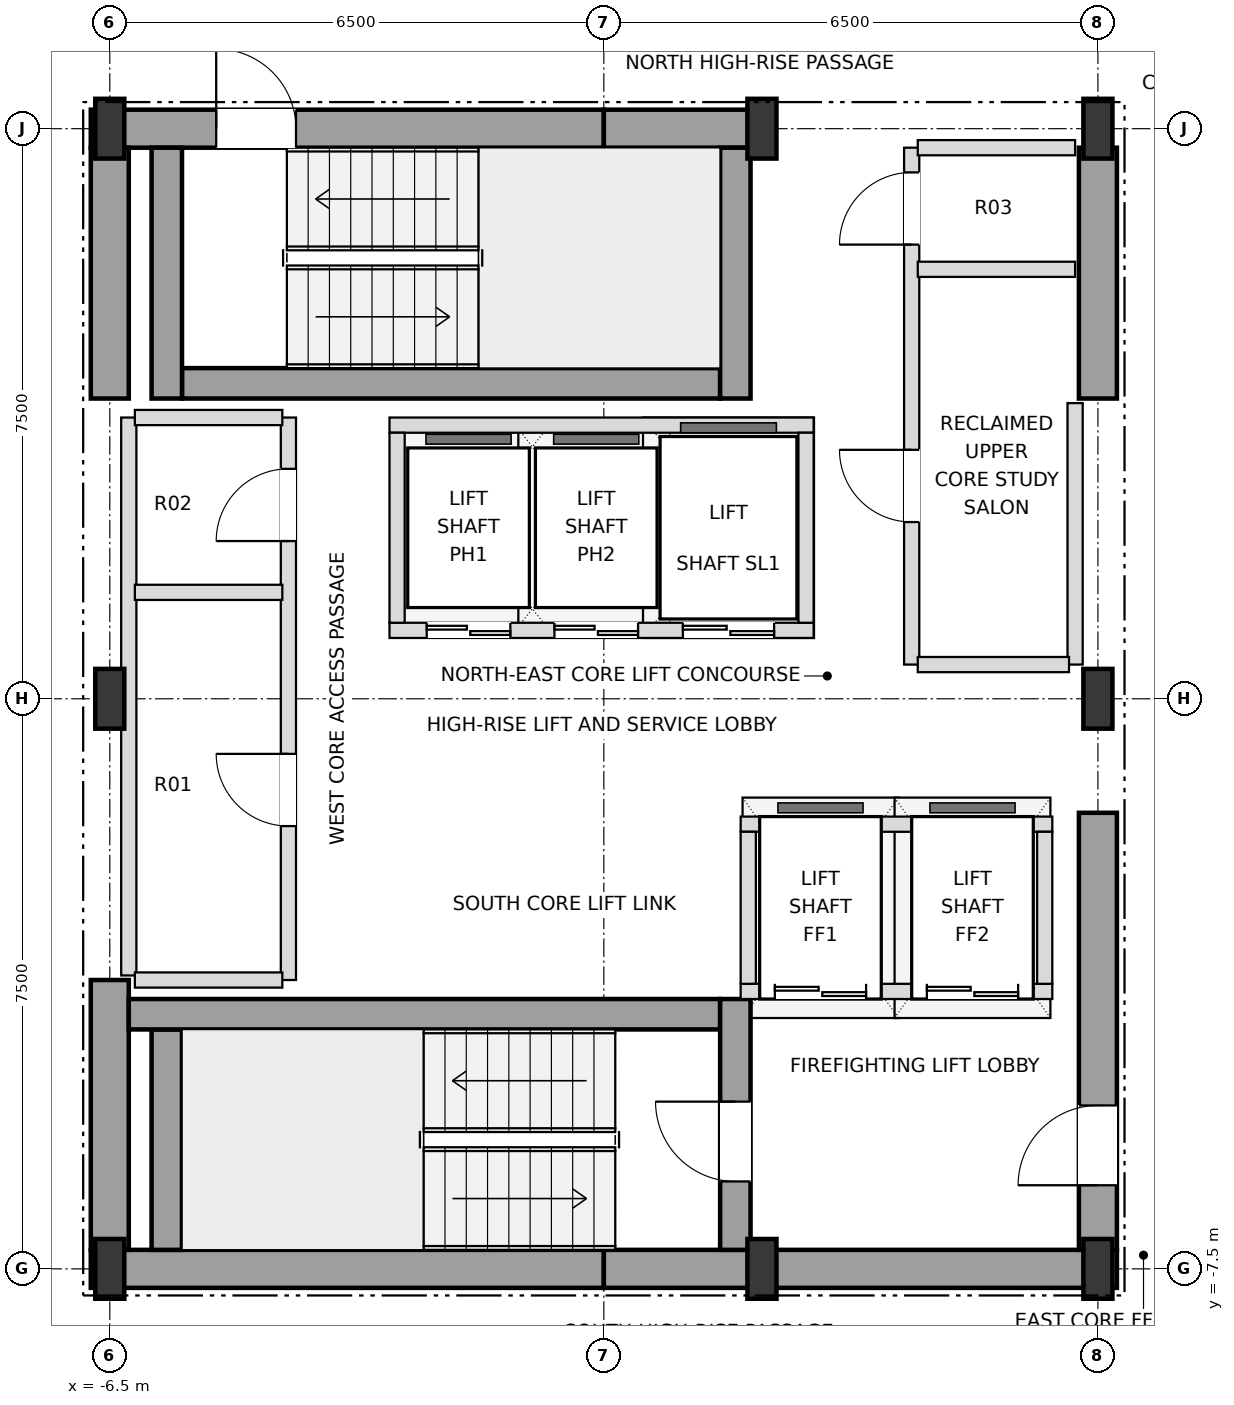
"""IFC4 building model, lengths in metres.
Left out: names, types, materials, properties, quantities, classifications, styles, units other than length and angle.
Written with IfcOpenShell. Run it as: python <this file> out.ifc"""

import sys

from ifc_helpers import new_model, si_unit, direction, frame, frame_2d, origin, origin_2d, place, context, subcontext, project, spatial, rectangle, i_section, extrude, element, fill, save


model = new_model("IFC4")
c1 = context("Model", 3, precision=1e-05, world=origin(), true_north=direction((0.0, 1.0)))
c2 = subcontext(c1, "Body", "Model", "MODEL_VIEW")
j1 = project(units=[si_unit("LENGTHUNIT", "METRE"), si_unit("PLANEANGLEUNIT", "RADIAN")], contexts=[c1])
p1 = place(None, origin())
s1 = spatial("IfcSite", under=j1, at=p1, CompositionType="ELEMENT")
p2 = place(p1, origin())
s2 = spatial("IfcBuilding", under=s1, at=p2, CompositionType="ELEMENT")
p3 = place(p2, frame((0.0, 0.0, 247.5)))
s3 = spatial("IfcBuildingStorey", under=s2, at=p3, CompositionType="ELEMENT", Elevation=247.5)
for number, where, z_axis, x_axis in (
    (1, (-6.5, -7.5, 0.0), (0.0, 0.0, 1.0), (1.0, 0.0, 0.0)),
    (2, (2.08, -7.5, 0.0), (0.0, 0.0, 1.0), (1.0, 0.0, 0.0)),
    (3, (6.5, -7.5, 0.0), (0.0, 0.0, 1.0), (1.0, 0.0, 0.0)),
    (4, (-6.5, 0.0, 0.0), (0.0, 0.0, 1.0), (1.0, 0.0, 0.0)),
    (5, (6.5, 0.0, 0.0), (0.0, 0.0, 1.0), (1.0, 0.0, 0.0)),
    (6, (-6.5, 7.5, 0.0), (0.0, 0.0, 1.0), (1.0, 0.0, 0.0)),
    (7, (2.08, 7.5, 0.0), (0.0, 0.0, 1.0), (1.0, 0.0, 0.0)),
    (8, (6.5, 7.5, 0.0), (0.0, 0.0, 1.0), (1.0, 0.0, 0.0)),
):
    element("IfcColumn", number, at=place(p3, frame(where, z_axis=z_axis, x_axis=x_axis)), inside=s3, PredefinedType="COLUMN", context=c2, shape_type="SweptSolid", body=[
        extrude(i_section(OverallWidth=0.382, OverallDepth=0.786, WebThickness=0.02, FlangeThickness=0.033, at=origin_2d()), origin(), (0.0, 0.0, 1.0), 3.6),
    ])
for number, where, z_axis, x_axis in (
    (9, (-6.75, -7.5, 0.0), (0.0, 0.0, 1.0), (1.0, 0.0, 0.0)),
    (10, (0.0, -7.5, 0.0), (0.0, 0.0, 1.0), (1.0, 0.0, 0.0)),
):
    element("IfcWall", number, at=place(p3, frame(where, z_axis=z_axis, x_axis=x_axis)), inside=s3, PredefinedType="SHEAR", context=c2, shape_type="SweptSolid", body=[
        extrude(rectangle(XDim=6.75, YDim=0.5, at=frame_2d((3.375, 0.0))), origin(), (0.0, 0.0, 1.0), 3.38),
    ])
p4 = place(p3, frame((-6.75, 7.5, 0.0), z_axis=(0.0, 0.0, 1.0), x_axis=(1.0, 0.0, 0.0)))
e11 = element("IfcWall", 11, at=p4, inside=s3, PredefinedType="SHEAR", context=c2, shape_type="SweptSolid", body=[
    extrude(rectangle(XDim=6.75, YDim=0.5, at=frame_2d((3.375, 0.0))), origin(), (0.0, 0.0, 1.0), 3.38),
])
p5 = place(p4, frame((1.65, 0.0, 0.0)))
e12 = element("IfcOpeningElement", 12, at=p5, cuts=e11, PredefinedType="OPENING", context=c2, shape_type="SweptSolid", body=[
    extrude(rectangle(XDim=1.05, YDim=2.15, at=frame_2d((0.525, 1.075))), frame((0.0, 0.26, 0.0), z_axis=(0.0, -1.0, 0.0), x_axis=(1.0, 0.0, 0.0)), (0.0, 0.0, 1.0), 0.52),
])
p6 = place(p3, frame((0.0, 7.5, 0.0), z_axis=(0.0, 0.0, 1.0), x_axis=(1.0, 0.0, 0.0)))
e13 = element("IfcWall", 13, at=p6, inside=s3, PredefinedType="SHEAR", context=c2, shape_type="SweptSolid", body=[
    extrude(rectangle(XDim=2.08, YDim=0.5, at=frame_2d((1.04, 0.0))), origin(), (0.0, 0.0, 1.0), 3.38),
])
p7 = place(p3, frame((-6.5, -7.25, 0.0), z_axis=(0.0, 0.0, 1.0), x_axis=(0.0, 1.0, 0.0)))
e14 = element("IfcWall", 14, at=p7, inside=s3, PredefinedType="SHEAR", context=c2, shape_type="SweptSolid", body=[
    extrude(rectangle(XDim=3.55, YDim=0.5, at=frame_2d((1.775, 0.0))), origin(), (0.0, 0.0, 1.0), 3.38),
])
p8 = place(p3, frame((-6.5, 3.95, 0.0), z_axis=(0.0, 0.0, 1.0), x_axis=(0.0, 1.0, 0.0)))
e15 = element("IfcWall", 15, at=p8, inside=s3, PredefinedType="SHEAR", context=c2, shape_type="SweptSolid", body=[
    extrude(rectangle(XDim=3.3, YDim=0.5, at=frame_2d((1.65, 0.0))), origin(), (0.0, 0.0, 1.0), 3.38),
])
p9 = place(p3, frame((6.5, -7.25, 0.0), z_axis=(0.0, 0.0, 1.0), x_axis=(0.0, 1.0, 0.0)))
e16 = element("IfcWall", 16, at=p9, inside=s3, PredefinedType="SHEAR", context=c2, shape_type="SweptSolid", body=[
    extrude(rectangle(XDim=5.75, YDim=0.5, at=frame_2d((2.875, 0.0))), origin(), (0.0, 0.0, 1.0), 3.38),
])
p10 = place(p9, frame((0.85, 0.0, 0.0)))
e17 = element("IfcOpeningElement", 17, at=p10, cuts=e16, PredefinedType="OPENING", context=c2, shape_type="SweptSolid", body=[
    extrude(rectangle(XDim=1.05, YDim=2.15, at=frame_2d((0.525, 1.075))), frame((0.0, 0.26, 0.0), z_axis=(0.0, -1.0, 0.0), x_axis=(1.0, 0.0, 0.0)), (0.0, 0.0, 1.0), 0.52),
])
p11 = place(p3, frame((6.5, 3.95, 0.0), z_axis=(0.0, 0.0, 1.0), x_axis=(0.0, 1.0, 0.0)))
e18 = element("IfcWall", 18, at=p11, inside=s3, PredefinedType="SHEAR", context=c2, shape_type="SweptSolid", body=[
    extrude(rectangle(XDim=3.3, YDim=0.5, at=frame_2d((1.65, 0.0))), origin(), (0.0, 0.0, 1.0), 3.38),
])
p12 = place(p3, frame((-5.75, -7.25, 0.0), z_axis=(0.0, 0.0, 1.0), x_axis=(0.0, 1.0, 0.0)))
e19 = element("IfcWall", 19, at=p12, inside=s3, PredefinedType="SHEAR", context=c2, shape_type="SweptSolid", body=[
    extrude(rectangle(XDim=2.9, YDim=0.4, at=frame_2d((1.45, 0.0))), origin(), (0.0, 0.0, 1.0), 3.38),
])
p13 = place(p3, frame((-6.25, -4.15, 0.0), z_axis=(0.0, 0.0, 1.0), x_axis=(1.0, 0.0, 0.0)))
e20 = element("IfcWall", 20, at=p13, inside=s3, PredefinedType="SHEAR", context=c2, shape_type="SweptSolid", body=[
    extrude(rectangle(XDim=7.78, YDim=0.4, at=frame_2d((3.89, 0.0))), origin(), (0.0, 0.0, 1.0), 3.38),
])
p14 = place(p3, frame((1.73, -7.25, 0.0), z_axis=(0.0, 0.0, 1.0), x_axis=(0.0, 1.0, 0.0)))
e21 = element("IfcWall", 21, at=p14, inside=s3, PredefinedType="SHEAR", context=c2, shape_type="SweptSolid", body=[
    extrude(rectangle(XDim=3.3, YDim=0.4, at=frame_2d((1.65, 0.0))), origin(), (0.0, 0.0, 1.0), 3.38),
])
p15 = place(p14, frame((0.9, 0.0, 0.0)))
e22 = element("IfcOpeningElement", 22, at=p15, cuts=e21, PredefinedType="OPENING", context=c2, shape_type="SweptSolid", body=[
    extrude(rectangle(XDim=1.05, YDim=2.15, at=frame_2d((0.525, 1.075))), frame((0.0, 0.21, 0.0), z_axis=(0.0, -1.0, 0.0), x_axis=(1.0, 0.0, 0.0)), (0.0, 0.0, 1.0), 0.42),
])
p16 = place(p3, frame((-5.55, 4.15, 0.0), z_axis=(0.0, 0.0, 1.0), x_axis=(1.0, 0.0, 0.0)))
e23 = element("IfcWall", 23, at=p16, inside=s3, PredefinedType="SHEAR", context=c2, shape_type="SweptSolid", body=[
    extrude(rectangle(XDim=7.08, YDim=0.4, at=frame_2d((3.54, 0.0))), origin(), (0.0, 0.0, 1.0), 3.38),
])
for number, where, z_axis, x_axis in (
    (24, (1.73, 3.95, 0.0), (0.0, 0.0, 1.0), (0.0, 1.0, 0.0)),
    (25, (-5.75, 3.95, 0.0), (0.0, 0.0, 1.0), (0.0, 1.0, 0.0)),
):
    element("IfcWall", number, at=place(p3, frame(where, z_axis=z_axis, x_axis=x_axis)), inside=s3, PredefinedType="SHEAR", context=c2, shape_type="SweptSolid", body=[
        extrude(rectangle(XDim=3.3, YDim=0.4, at=frame_2d((1.65, 0.0))), origin(), (0.0, 0.0, 1.0), 3.38),
    ])
p17 = place(p3, frame((-2.82, 0.9, 0.0), z_axis=(0.0, 0.0, 1.0), x_axis=(1.0, 0.0, 0.0)))
e26 = element("IfcWall", 26, at=p17, inside=s3, PredefinedType="SOLIDWALL", context=c2, shape_type="SweptSolid", body=[
    extrude(rectangle(XDim=5.58, YDim=0.2, at=frame_2d((2.79, 0.0))), origin(), (0.0, 0.0, 1.0), 3.38),
])
p18 = place(p17, frame((0.49, 0.0, 0.0)))
e27 = element("IfcOpeningElement", 27, at=p18, cuts=e26, PredefinedType="OPENING", context=c2, shape_type="SweptSolid", body=[
    extrude(rectangle(XDim=1.1, YDim=2.15, at=frame_2d((0.55, 1.075))), frame((0.0, 0.11, 0.0), z_axis=(0.0, -1.0, 0.0), x_axis=(1.0, 0.0, 0.0)), (0.0, 0.0, 1.0), 0.22),
])
p19 = place(p17, frame((2.17, 0.0, 0.0)))
e28 = element("IfcOpeningElement", 28, at=p19, cuts=e26, PredefinedType="OPENING", context=c2, shape_type="SweptSolid", body=[
    extrude(rectangle(XDim=1.1, YDim=2.15, at=frame_2d((0.55, 1.075))), frame((0.0, 0.11, 0.0), z_axis=(0.0, -1.0, 0.0), x_axis=(1.0, 0.0, 0.0)), (0.0, 0.0, 1.0), 0.22),
])
p20 = place(p17, frame((3.86, 0.0, 0.0)))
e29 = element("IfcOpeningElement", 29, at=p20, cuts=e26, PredefinedType="OPENING", context=c2, shape_type="SweptSolid", body=[
    extrude(rectangle(XDim=1.2, YDim=2.2, at=frame_2d((0.6, 1.1))), frame((0.0, 0.11, 0.0), z_axis=(0.0, -1.0, 0.0), x_axis=(1.0, 0.0, 0.0)), (0.0, 0.0, 1.0), 0.22),
])
p21 = place(p3, frame((-2.82, 3.6, 0.0), z_axis=(0.0, 0.0, 1.0), x_axis=(1.0, 0.0, 0.0)))
e30 = element("IfcWall", 30, at=p21, inside=s3, PredefinedType="SOLIDWALL", context=c2, shape_type="SweptSolid", body=[
    extrude(rectangle(XDim=5.58, YDim=0.2, at=frame_2d((2.79, 0.0))), origin(), (0.0, 0.0, 1.0), 3.38),
])
for number, where, z_axis, x_axis in (
    (31, (-2.72, 1.0, 0.0), (0.0, 0.0, 1.0), (0.0, 1.0, 0.0)),
    (32, (2.66, 1.0, 0.0), (0.0, 0.0, 1.0), (0.0, 1.0, 0.0)),
):
    element("IfcWall", number, at=place(p3, frame(where, z_axis=z_axis, x_axis=x_axis)), inside=s3, PredefinedType="SOLIDWALL", context=c2, shape_type="SweptSolid", body=[
        extrude(rectangle(XDim=2.5, YDim=0.2, at=frame_2d((1.25, 0.0))), origin(), (0.0, 0.0, 1.0), 3.38),
    ])
p22 = place(p3, frame((1.8, -3.85, 0.0), z_axis=(0.0, 0.0, 1.0), x_axis=(1.0, 0.0, 0.0)))
e33 = element("IfcWall", 33, at=p22, inside=s3, PredefinedType="SOLIDWALL", context=c2, shape_type="SweptSolid", body=[
    extrude(rectangle(XDim=4.1, YDim=0.2, at=frame_2d((2.05, 0.0))), origin(), (0.0, 0.0, 1.0), 3.38),
])
p23 = place(p22, frame((0.45, 0.0, 0.0)))
e34 = element("IfcOpeningElement", 34, at=p23, cuts=e33, PredefinedType="OPENING", context=c2, shape_type="SweptSolid", body=[
    extrude(rectangle(XDim=1.2, YDim=2.2, at=frame_2d((0.6, 1.1))), frame((0.0, 0.11, 0.0), z_axis=(0.0, -1.0, 0.0), x_axis=(1.0, 0.0, 0.0)), (0.0, 0.0, 1.0), 0.22),
])
p24 = place(p22, frame((2.45, 0.0, 0.0)))
e35 = element("IfcOpeningElement", 35, at=p24, cuts=e33, PredefinedType="OPENING", context=c2, shape_type="SweptSolid", body=[
    extrude(rectangle(XDim=1.2, YDim=2.2, at=frame_2d((0.6, 1.1))), frame((0.0, 0.11, 0.0), z_axis=(0.0, -1.0, 0.0), x_axis=(1.0, 0.0, 0.0)), (0.0, 0.0, 1.0), 0.22),
])
p25 = place(p3, frame((1.8, -1.65, 0.0), z_axis=(0.0, 0.0, 1.0), x_axis=(1.0, 0.0, 0.0)))
e36 = element("IfcWall", 36, at=p25, inside=s3, PredefinedType="SOLIDWALL", context=c2, shape_type="SweptSolid", body=[
    extrude(rectangle(XDim=4.1, YDim=0.2, at=frame_2d((2.05, 0.0))), origin(), (0.0, 0.0, 1.0), 3.38),
])
for number, where, z_axis, x_axis in (
    (37, (1.9, -3.75, 0.0), (0.0, 0.0, 1.0), (0.0, 1.0, 0.0)),
    (38, (5.8, -3.75, 0.0), (0.0, 0.0, 1.0), (0.0, 1.0, 0.0)),
):
    element("IfcWall", number, at=place(p3, frame(where, z_axis=z_axis, x_axis=x_axis)), inside=s3, PredefinedType="SOLIDWALL", context=c2, shape_type="SweptSolid", body=[
        extrude(rectangle(XDim=2.0, YDim=0.2, at=frame_2d((1.0, 0.0))), origin(), (0.0, 0.0, 1.0), 3.38),
    ])
p26 = place(p3, frame((-6.25, -3.64, 0.0), z_axis=(0.0, 0.0, 1.0), x_axis=(0.0, 1.0, 0.0)))
e39 = element("IfcWall", 39, at=p26, inside=s3, PredefinedType="SOLIDWALL", context=c2, shape_type="SweptSolid", body=[
    extrude(rectangle(XDim=7.34, YDim=0.2, at=frame_2d((3.67, 0.0))), origin(), (0.0, 0.0, 1.0), 3.38),
])
p27 = place(p3, frame((-4.15, -3.7, 0.0), z_axis=(0.0, 0.0, 1.0), x_axis=(0.0, 1.0, 0.0)))
e40 = element("IfcWall", 40, at=p27, inside=s3, PredefinedType="SOLIDWALL", context=c2, shape_type="SweptSolid", body=[
    extrude(rectangle(XDim=7.4, YDim=0.2, at=frame_2d((3.7, 0.0))), origin(), (0.0, 0.0, 1.0), 3.38),
])
p28 = place(p27, frame((2.025, 0.0, 0.0)))
e41 = element("IfcOpeningElement", 41, at=p28, cuts=e40, PredefinedType="OPENING", context=c2, shape_type="SweptSolid", body=[
    extrude(rectangle(XDim=0.95, YDim=2.15, at=frame_2d((0.475, 1.075))), frame((0.0, 0.11, 0.0), z_axis=(0.0, -1.0, 0.0), x_axis=(1.0, 0.0, 0.0)), (0.0, 0.0, 1.0), 0.22),
])
p29 = place(p27, frame((5.775, 0.0, 0.0)))
e42 = element("IfcOpeningElement", 42, at=p29, cuts=e40, PredefinedType="OPENING", context=c2, shape_type="SweptSolid", body=[
    extrude(rectangle(XDim=0.95, YDim=2.15, at=frame_2d((0.475, 1.075))), frame((0.0, 0.11, 0.0), z_axis=(0.0, -1.0, 0.0), x_axis=(1.0, 0.0, 0.0)), (0.0, 0.0, 1.0), 0.22),
])
p30 = place(p3, frame((4.05, 0.45, 0.0), z_axis=(0.0, 0.0, 1.0), x_axis=(0.0, 1.0, 0.0)))
e43 = element("IfcWall", 43, at=p30, inside=s3, PredefinedType="SOLIDWALL", context=c2, shape_type="SweptSolid", body=[
    extrude(rectangle(XDim=6.8, YDim=0.2, at=frame_2d((3.4, 0.0))), origin(), (0.0, 0.0, 1.0), 3.38),
])
p31 = place(p30, frame((1.875, 0.0, 0.0)))
e44 = element("IfcOpeningElement", 44, at=p31, cuts=e43, PredefinedType="OPENING", context=c2, shape_type="SweptSolid", body=[
    extrude(rectangle(XDim=0.95, YDim=2.15, at=frame_2d((0.475, 1.075))), frame((0.0, 0.11, 0.0), z_axis=(0.0, -1.0, 0.0), x_axis=(1.0, 0.0, 0.0)), (0.0, 0.0, 1.0), 0.22),
])
p32 = place(p30, frame((5.525, 0.0, 0.0)))
e45 = element("IfcOpeningElement", 45, at=p32, cuts=e43, PredefinedType="OPENING", context=c2, shape_type="SweptSolid", body=[
    extrude(rectangle(XDim=0.95, YDim=2.15, at=frame_2d((0.475, 1.075))), frame((0.0, 0.11, 0.0), z_axis=(0.0, -1.0, 0.0), x_axis=(1.0, 0.0, 0.0)), (0.0, 0.0, 1.0), 0.22),
])
p33 = place(p3, frame((6.2, 0.45, 0.0), z_axis=(0.0, 0.0, 1.0), x_axis=(0.0, 1.0, 0.0)))
e46 = element("IfcWall", 46, at=p33, inside=s3, PredefinedType="SOLIDWALL", context=c2, shape_type="SweptSolid", body=[
    extrude(rectangle(XDim=3.44, YDim=0.2, at=frame_2d((1.72, 0.0))), origin(), (0.0, 0.0, 1.0), 3.38),
])
p34 = place(p3, frame((-6.17, -3.7, 0.0), z_axis=(0.0, 0.0, 1.0), x_axis=(1.0, 0.0, 0.0)))
e47 = element("IfcWall", 47, at=p34, inside=s3, PredefinedType="SOLIDWALL", context=c2, shape_type="SweptSolid", body=[
    extrude(rectangle(XDim=1.94, YDim=0.2, at=frame_2d((0.97, 0.0))), origin(), (0.0, 0.0, 1.0), 3.38),
])
p35 = place(p3, frame((4.13, 0.45, 0.0), z_axis=(0.0, 0.0, 1.0), x_axis=(1.0, 0.0, 0.0)))
e48 = element("IfcWall", 48, at=p35, inside=s3, PredefinedType="SOLIDWALL", context=c2, shape_type="SweptSolid", body=[
    extrude(rectangle(XDim=1.99, YDim=0.2, at=frame_2d((0.995, 0.0))), origin(), (0.0, 0.0, 1.0), 3.38),
])
for number, where, z_axis, x_axis in (
    (49, (-6.17, 1.4, 0.0), (0.0, 0.0, 1.0), (1.0, 0.0, 0.0)),
    (50, (-6.17, 3.7, 0.0), (0.0, 0.0, 1.0), (1.0, 0.0, 0.0)),
):
    element("IfcWall", number, at=place(p3, frame(where, z_axis=z_axis, x_axis=x_axis)), inside=s3, PredefinedType="SOLIDWALL", context=c2, shape_type="SweptSolid", body=[
        extrude(rectangle(XDim=1.94, YDim=0.2, at=frame_2d((0.97, 0.0))), origin(), (0.0, 0.0, 1.0), 3.38),
    ])
for number, where, z_axis, x_axis in (
    (51, (4.13, 5.65, 0.0), (0.0, 0.0, 1.0), (1.0, 0.0, 0.0)),
    (52, (4.13, 7.25, 0.0), (0.0, 0.0, 1.0), (1.0, 0.0, 0.0)),
):
    element("IfcWall", number, at=place(p3, frame(where, z_axis=z_axis, x_axis=x_axis)), inside=s3, PredefinedType="SOLIDWALL", context=c2, shape_type="SweptSolid", body=[
        extrude(rectangle(XDim=2.07, YDim=0.2, at=frame_2d((1.035, 0.0))), origin(), (0.0, 0.0, 1.0), 3.38),
    ])
p36 = place(p10, origin())
e53 = element("IfcDoor", 53, at=p36, inside=s3, OperationType="SINGLE_SWING_LEFT", PredefinedType="DOOR", context=c2, shape_type="SweptSolid", body=[
    extrude(rectangle(XDim=1.05, YDim=2.15, at=frame_2d((0.525, 1.075))), frame((0.0, 0.025, 0.0), z_axis=(0.0, -1.0, 0.0), x_axis=(1.0, 0.0, 0.0)), (0.0, 0.0, 1.0), 0.05),
])
fill(e17, e53)
p37 = place(p15, origin())
e54 = element("IfcDoor", 54, at=p37, inside=s3, OperationType="SINGLE_SWING_RIGHT", PredefinedType="DOOR", context=c2, shape_type="SweptSolid", body=[
    extrude(rectangle(XDim=1.05, YDim=2.15, at=frame_2d((0.525, 1.075))), frame((0.0, 0.025, 0.0), z_axis=(0.0, -1.0, 0.0), x_axis=(1.0, 0.0, 0.0)), (0.0, 0.0, 1.0), 0.05),
])
fill(e22, e54)
p38 = place(p5, origin())
e55 = element("IfcDoor", 55, at=p38, inside=s3, OperationType="SINGLE_SWING_LEFT", PredefinedType="DOOR", context=c2, shape_type="SweptSolid", body=[
    extrude(rectangle(XDim=1.05, YDim=2.15, at=frame_2d((0.525, 1.075))), frame((0.0, 0.025, 0.0), z_axis=(0.0, -1.0, 0.0), x_axis=(1.0, 0.0, 0.0)), (0.0, 0.0, 1.0), 0.05),
])
fill(e12, e55)
p39 = place(p18, origin())
e56 = element("IfcDoor", 56, at=p39, inside=s3, OperationType="DOUBLE_DOOR_SLIDING", PredefinedType="DOOR", context=c2, shape_type="SweptSolid", body=[
    extrude(rectangle(XDim=1.1, YDim=2.15, at=frame_2d((0.55, 1.075))), frame((0.0, 0.025, 0.0), z_axis=(0.0, -1.0, 0.0), x_axis=(1.0, 0.0, 0.0)), (0.0, 0.0, 1.0), 0.05),
])
fill(e27, e56)
p40 = place(p19, origin())
e57 = element("IfcDoor", 57, at=p40, inside=s3, OperationType="DOUBLE_DOOR_SLIDING", PredefinedType="DOOR", context=c2, shape_type="SweptSolid", body=[
    extrude(rectangle(XDim=1.1, YDim=2.15, at=frame_2d((0.55, 1.075))), frame((0.0, 0.025, 0.0), z_axis=(0.0, -1.0, 0.0), x_axis=(1.0, 0.0, 0.0)), (0.0, 0.0, 1.0), 0.05),
])
fill(e28, e57)
p41 = place(p20, origin())
e58 = element("IfcDoor", 58, at=p41, inside=s3, OperationType="DOUBLE_DOOR_SLIDING", PredefinedType="DOOR", context=c2, shape_type="SweptSolid", body=[
    extrude(rectangle(XDim=1.2, YDim=2.2, at=frame_2d((0.6, 1.1))), frame((0.0, 0.025, 0.0), z_axis=(0.0, -1.0, 0.0), x_axis=(1.0, 0.0, 0.0)), (0.0, 0.0, 1.0), 0.05),
])
fill(e29, e58)
p42 = place(p23, origin())
e59 = element("IfcDoor", 59, at=p42, inside=s3, OperationType="DOUBLE_DOOR_SLIDING", PredefinedType="DOOR", context=c2, shape_type="SweptSolid", body=[
    extrude(rectangle(XDim=1.2, YDim=2.2, at=frame_2d((0.6, 1.1))), frame((0.0, 0.025, 0.0), z_axis=(0.0, -1.0, 0.0), x_axis=(1.0, 0.0, 0.0)), (0.0, 0.0, 1.0), 0.05),
])
fill(e34, e59)
p43 = place(p24, origin())
e60 = element("IfcDoor", 60, at=p43, inside=s3, OperationType="DOUBLE_DOOR_SLIDING", PredefinedType="DOOR", context=c2, shape_type="SweptSolid", body=[
    extrude(rectangle(XDim=1.2, YDim=2.2, at=frame_2d((0.6, 1.1))), frame((0.0, 0.025, 0.0), z_axis=(0.0, -1.0, 0.0), x_axis=(1.0, 0.0, 0.0)), (0.0, 0.0, 1.0), 0.05),
])
fill(e35, e60)
p44 = place(p28, origin())
e61 = element("IfcDoor", 61, at=p44, inside=s3, OperationType="SINGLE_SWING_RIGHT", PredefinedType="DOOR", context=c2, shape_type="SweptSolid", body=[
    extrude(rectangle(XDim=0.95, YDim=2.15, at=frame_2d((0.475, 1.075))), frame((0.0, 0.025, 0.0), z_axis=(0.0, -1.0, 0.0), x_axis=(1.0, 0.0, 0.0)), (0.0, 0.0, 1.0), 0.05),
])
fill(e41, e61)
p45 = place(p29, origin())
e62 = element("IfcDoor", 62, at=p45, inside=s3, OperationType="SINGLE_SWING_LEFT", PredefinedType="DOOR", context=c2, shape_type="SweptSolid", body=[
    extrude(rectangle(XDim=0.95, YDim=2.15, at=frame_2d((0.475, 1.075))), frame((0.0, 0.025, 0.0), z_axis=(0.0, -1.0, 0.0), x_axis=(1.0, 0.0, 0.0)), (0.0, 0.0, 1.0), 0.05),
])
fill(e42, e62)
p46 = place(p31, origin())
e63 = element("IfcDoor", 63, at=p46, inside=s3, OperationType="SINGLE_SWING_RIGHT", PredefinedType="DOOR", context=c2, shape_type="SweptSolid", body=[
    extrude(rectangle(XDim=0.95, YDim=2.15, at=frame_2d((0.475, 1.075))), frame((0.0, 0.025, 0.0), z_axis=(0.0, -1.0, 0.0), x_axis=(1.0, 0.0, 0.0)), (0.0, 0.0, 1.0), 0.05),
])
fill(e44, e63)
p47 = place(p32, origin())
e64 = element("IfcDoor", 64, at=p47, inside=s3, OperationType="SINGLE_SWING_LEFT", PredefinedType="DOOR", context=c2, shape_type="SweptSolid", body=[
    extrude(rectangle(XDim=0.95, YDim=2.15, at=frame_2d((0.475, 1.075))), frame((0.0, 0.025, 0.0), z_axis=(0.0, -1.0, 0.0), x_axis=(1.0, 0.0, 0.0)), (0.0, 0.0, 1.0), 0.05),
])
fill(e45, e64)
save(model, sys.argv[1])
